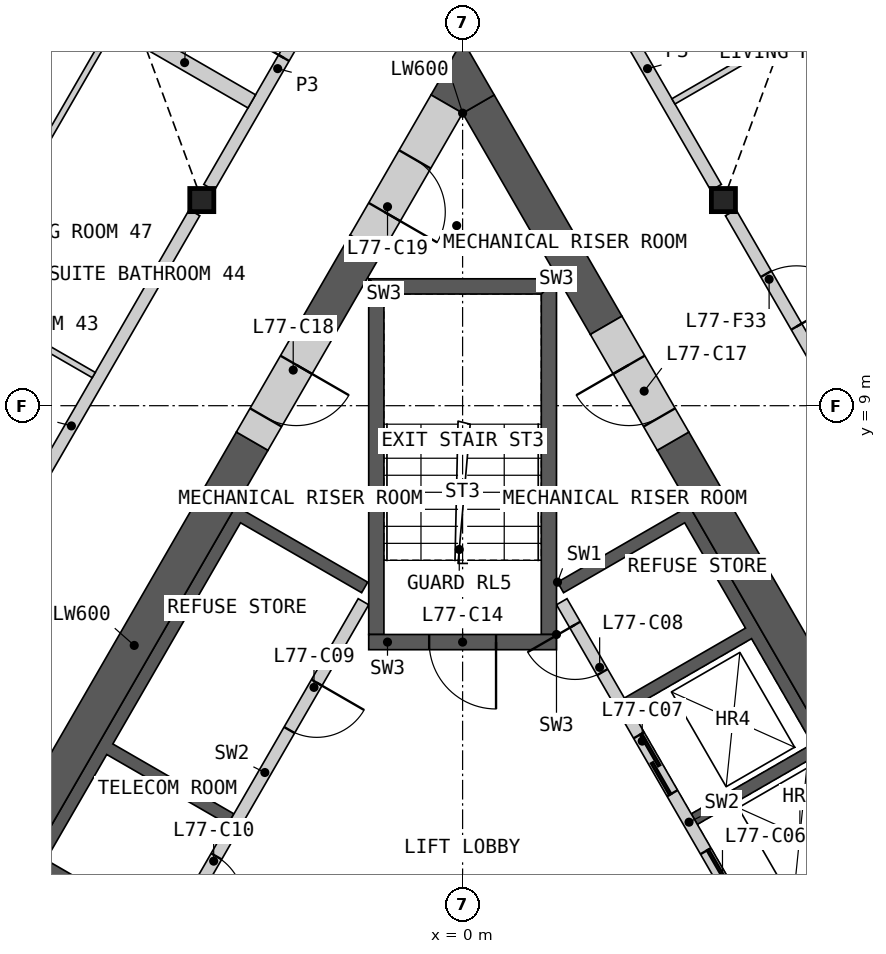
"""IFC4 building model, lengths in metres.
Left out: names, types, materials, properties, quantities, classifications, styles, units other than length and angle.
Written with IfcOpenShell. Run it as: python <this file> out.ifc"""

import sys

from ifc_helpers import new_model, si_unit, direction, frame, frame_2d, origin, origin_2d, place, context, subcontext, project, spatial, polyline, rectangle, i_section, outline, extrude, element, fill, save


model = new_model("IFC4")
c1 = context("Model", 3, precision=1e-05, world=origin(), true_north=direction((0.0, 1.0)))
c2 = subcontext(c1, "Body", "Model", "MODEL_VIEW")
j1 = project(units=[si_unit("LENGTHUNIT", "METRE"), si_unit("PLANEANGLEUNIT", "RADIAN")], contexts=[c1])
p1 = place(None, origin())
s1 = spatial("IfcSite", under=j1, at=p1, CompositionType="ELEMENT")
p2 = place(p1, origin())
s2 = spatial("IfcBuilding", under=s1, at=p2, CompositionType="ELEMENT")
p3 = place(p2, frame((0.0, 0.0, 342.6)))
s3 = spatial("IfcBuildingStorey", under=s2, at=p3, CompositionType="ELEMENT", Elevation=342.6)
for number, where, z_axis, x_axis in (
    (1, (-4.289, 12.382, 0.0), (0.0, 0.0, 1.0), (1.0, 0.0, 0.0)),
    (2, (4.289, 12.382, 0.0), (0.0, 0.0, 1.0), (1.0, 0.0, 0.0)),
):
    element("IfcColumn", number, at=place(p3, frame(where, z_axis=z_axis, x_axis=x_axis)), inside=s3, PredefinedType="COLUMN", context=c2, shape_type="SweptSolid", body=[
        extrude(i_section(OverallWidth=0.396, OverallDepth=0.381, WebThickness=0.019, FlangeThickness=0.03, at=origin_2d()), origin(), (0.0, 0.0, 1.0), 3.4),
    ])
p4 = place(p3, origin())
e3 = element("IfcWall", 3, at=p4, inside=s3, PredefinedType="SHEAR", context=c2, shape_type="SweptSolid", body=[
    extrude(outline(polyline([(1.561, 6.097), (3.731, 7.35), (8.231, -0.444), (6.061, -1.697), (5.96, -1.524), (7.952, -0.374), (6.952, 1.358), (4.96, 0.208), (4.861, 0.381), (6.852, 1.531), (5.852, 3.263), (3.861, 2.113), (3.76, 2.287), (5.752, 3.437), (4.752, 5.169), (2.76, 4.019), (2.66, 4.192), (4.652, 5.342), (3.652, 7.074), (1.66, 5.924), (1.561, 6.097)])), origin(), (0.0, 0.0, 1.0), 3.1),
])
p5 = place(p3, frame((5.817, -1.476, 0.0), z_axis=(0.0, 0.0, 1.0), x_axis=(-0.500002616675, 0.866023893041, 0.0)))
e4 = element("IfcWall", 4, at=p5, inside=s3, PredefinedType="SOLIDWALL", context=c2, shape_type="SweptSolid", body=[
    extrude(rectangle(XDim=8.373, YDim=0.2, at=frame_2d((4.187, 0.0))), origin(), (0.0, 0.0, 1.0), 3.1),
])
p6 = place(p5, frame((0.337, 0.0, 0.0)))
e5 = element("IfcOpeningElement", 5, at=p6, cuts=e4, PredefinedType="OPENING", context=c2, shape_type="SweptSolid", body=[
    extrude(rectangle(XDim=1.1, YDim=2.1, at=frame_2d((0.55, 1.05))), frame((0.0, 0.11, 0.0), z_axis=(0.0, -1.0, 0.0), x_axis=(1.0, 0.0, 0.0)), (0.0, 0.0, 1.0), 0.22),
])
p7 = place(p5, frame((2.537, 0.0, 0.0)))
e6 = element("IfcOpeningElement", 6, at=p7, cuts=e4, PredefinedType="OPENING", context=c2, shape_type="SweptSolid", body=[
    extrude(rectangle(XDim=1.1, YDim=2.1, at=frame_2d((0.55, 1.05))), frame((0.0, 0.11, 0.0), z_axis=(0.0, -1.0, 0.0), x_axis=(1.0, 0.0, 0.0)), (0.0, 0.0, 1.0), 0.22),
])
p8 = place(p5, frame((4.737, 0.0, 0.0)))
e7 = element("IfcOpeningElement", 7, at=p8, cuts=e4, PredefinedType="OPENING", context=c2, shape_type="SweptSolid", body=[
    extrude(rectangle(XDim=1.1, YDim=2.1, at=frame_2d((0.55, 1.05))), frame((0.0, 0.11, 0.0), z_axis=(0.0, -1.0, 0.0), x_axis=(1.0, 0.0, 0.0)), (0.0, 0.0, 1.0), 0.22),
])
p9 = place(p5, frame((7.037, 0.0, 0.0)))
e8 = element("IfcOpeningElement", 8, at=p9, cuts=e4, PredefinedType="OPENING", context=c2, shape_type="SweptSolid", body=[
    extrude(rectangle(XDim=0.9, YDim=2.1, at=frame_2d((0.45, 1.05))), frame((0.0, 0.11, 0.0), z_axis=(0.0, -1.0, 0.0), x_axis=(1.0, 0.0, 0.0)), (0.0, 0.0, 1.0), 0.22),
])
p10 = place(p3, origin())
e9 = element("IfcWall", 9, at=p10, inside=s3, PredefinedType="SHEAR", context=c2, shape_type="SweptSolid", body=[
    extrude(outline(polyline([(-4.96, 0.208), (-7.131, 1.461), (-3.731, 7.35), (-1.561, 6.097), (-1.66, 5.924), (-3.652, 7.074), (-5.752, 3.437), (-3.76, 2.287), (-3.861, 2.113), (-5.852, 3.263), (-6.852, 1.531), (-4.861, 0.381), (-4.96, 0.208)])), origin(), (0.0, 0.0, 1.0), 3.1),
])
p11 = place(p3, frame((-1.631, 5.776, 0.0), z_axis=(0.0, 0.0, 1.0), x_axis=(-0.499992876559, -0.866029516466, 0.0)))
e10 = element("IfcWall", 10, at=p11, inside=s3, PredefinedType="SOLIDWALL", context=c2, shape_type="SweptSolid", body=[
    extrude(rectangle(XDim=6.486, YDim=0.2, at=frame_2d((3.243, 0.0))), origin(), (0.0, 0.0, 1.0), 3.1),
])
p12 = place(p11, frame((1.537, 0.0, 0.0)))
e11 = element("IfcOpeningElement", 11, at=p12, cuts=e10, PredefinedType="OPENING", context=c2, shape_type="SweptSolid", body=[
    extrude(rectangle(XDim=0.9, YDim=2.1, at=frame_2d((0.45, 1.05))), frame((0.0, 0.11, 0.0), z_axis=(0.0, -1.0, 0.0), x_axis=(1.0, 0.0, 0.0)), (0.0, 0.0, 1.0), 0.22),
])
p13 = place(p11, frame((4.837, 0.0, 0.0)))
e12 = element("IfcOpeningElement", 12, at=p13, cuts=e10, PredefinedType="OPENING", context=c2, shape_type="SweptSolid", body=[
    extrude(rectangle(XDim=0.9, YDim=2.1, at=frame_2d((0.45, 1.05))), frame((0.0, 0.11, 0.0), z_axis=(0.0, -1.0, 0.0), x_axis=(1.0, 0.0, 0.0)), (0.0, 0.0, 1.0), 0.22),
])
p14 = place(p3, origin())
e13 = element("IfcWall", 13, at=p14, inside=s3, PredefinedType="SHEAR", context=c2, shape_type="SweptSolid", body=[
    extrude(outline(polyline([(1.544, 5.237), (1.544, 11.087), (1.294, 10.837), (1.294, 5.237), (1.544, 5.237)])), origin(), (0.0, 0.0, 1.0), 3.1),
])
p15 = place(p3, origin())
e14 = element("IfcWall", 14, at=p15, inside=s3, PredefinedType="SHEAR", context=c2, shape_type="SweptSolid", body=[
    extrude(outline(polyline([(1.544, 11.087), (-1.544, 11.087), (-1.294, 10.837), (1.294, 10.837), (1.544, 11.087)])), origin(), (0.0, 0.0, 1.0), 3.1),
])
p16 = place(p3, origin())
e15 = element("IfcWall", 15, at=p16, inside=s3, PredefinedType="SHEAR", context=c2, shape_type="SweptSolid", body=[
    extrude(outline(polyline([(-1.294, 10.837), (-1.544, 11.087), (-1.544, 5.237), (-1.294, 5.237), (-1.294, 10.837)])), origin(), (0.0, 0.0, 1.0), 3.1),
])
p17 = place(p3, frame((1.544, 5.112, 0.0), z_axis=(0.0, 0.0, 1.0), x_axis=(-1.0, 0.0, 0.0)))
e16 = element("IfcWall", 16, at=p17, inside=s3, PredefinedType="SHEAR", context=c2, shape_type="SweptSolid", body=[
    extrude(rectangle(XDim=3.088, YDim=0.25, at=frame_2d((1.544, 0.0))), origin(), (0.0, 0.0, 1.0), 3.1),
])
p18 = place(p17, frame((0.994, 0.0, 0.0)))
e17 = element("IfcOpeningElement", 17, at=p18, cuts=e16, PredefinedType="OPENING", context=c2, shape_type="SweptSolid", body=[
    extrude(rectangle(XDim=1.1, YDim=2.1, at=frame_2d((0.55, 1.05))), frame((0.0, 0.135, 0.0), z_axis=(0.0, -1.0, 0.0), x_axis=(1.0, 0.0, 0.0)), (0.0, 0.0, 1.0), 0.27),
])
p19 = place(p3, frame((8.686, -0.634, 0.0), z_axis=(0.0, 0.0, 1.0), x_axis=(-0.50001836461, 0.866014800712, 0.0)))
e18 = element("IfcWall", 18, at=p19, inside=s3, PredefinedType="SHEAR", context=c2, shape_type="SweptSolid", body=[
    extrude(rectangle(XDim=10.451, YDim=0.6, at=frame_2d((5.225, 0.0))), origin(), (0.0, 0.0, 1.0), 3.1),
])
p20 = place(p3, frame((2.361, 10.322, 0.0), z_axis=(0.0, 0.0, 1.0), x_axis=(-0.500000735859, 0.866024978935, 0.0)))
e19 = element("IfcWall", 19, at=p20, inside=s3, PredefinedType="SHEAR", context=c2, shape_type="SweptSolid", body=[
    extrude(rectangle(XDim=4.202, YDim=0.6, at=frame_2d((2.101, 0.0))), origin(), (0.0, 0.0, 1.0), 3.1),
])
p21 = place(p3, frame((-3.461, 8.417, 0.0), z_axis=(0.0, 0.0, 1.0), x_axis=(-0.50000391502, -0.866023143435, 0.0)))
e20 = element("IfcWall", 20, at=p21, inside=s3, PredefinedType="SHEAR", context=c2, shape_type="SweptSolid", body=[
    extrude(rectangle(XDim=7.759, YDim=0.6, at=frame_2d((3.879, 0.0))), origin(), (0.0, 0.0, 1.0), 3.1),
])
p22 = place(p3, frame((-1.59, 11.658, 0.0), z_axis=(0.0, 0.0, 1.0), x_axis=(-0.500037594623, -0.866003697431, 0.0)))
e21 = element("IfcWall", 21, at=p22, inside=s3, PredefinedType="SHEAR", context=c2, shape_type="SweptSolid", body=[
    extrude(rectangle(XDim=1.542, YDim=0.6, at=frame_2d((0.771, 0.0))), origin(), (0.0, 0.0, 1.0), 3.1),
])
p23 = place(p3, origin())
e22 = element("IfcWall", 22, at=p23, inside=s3, PredefinedType="SHEAR", context=c2, shape_type="SweptSolid", body=[
    extrude(outline(polyline([(0.0, 13.811), (-0.52, 14.111), (0.0, 15.011), (0.52, 14.111), (0.0, 13.811)])), origin(), (0.0, 0.0, 1.0), 3.1),
])
p24 = place(p3, frame((3.461, 8.417, 0.0), z_axis=(0.0, 0.0, 1.0), x_axis=(-0.499946605688, 0.86605622881, 0.0)))
e23 = element("IfcWall", 23, at=p24, inside=s3, PredefinedType="SHEAR", context=c2, shape_type="SweptSolid", body=[
    extrude(rectangle(XDim=2.2, YDim=0.6, at=frame_2d((1.1, 0.0))), origin(), (0.0, 0.0, 1.0), 3.1),
])
p25 = place(p24, frame((0.45, 0.0, 0.0)))
e24 = element("IfcOpeningElement", 24, at=p25, cuts=e23, PredefinedType="OPENING", context=c2, shape_type="SweptSolid", body=[
    extrude(rectangle(XDim=1.0, YDim=2.1, at=frame_2d((0.5, 1.05))), frame((0.0, 0.31, 0.0), z_axis=(0.0, -1.0, 0.0), x_axis=(1.0, 0.0, 0.0)), (0.0, 0.0, 1.0), 0.62),
])
p26 = place(p3, frame((-2.361, 10.322, 0.0), z_axis=(0.0, 0.0, 1.0), x_axis=(-0.499946605688, -0.86605622881, 0.0)))
e25 = element("IfcWall", 25, at=p26, inside=s3, PredefinedType="SHEAR", context=c2, shape_type="SweptSolid", body=[
    extrude(rectangle(XDim=2.2, YDim=0.6, at=frame_2d((1.1, 0.0))), origin(), (0.0, 0.0, 1.0), 3.1),
])
p27 = place(p26, frame((0.75, 0.0, 0.0)))
e26 = element("IfcOpeningElement", 26, at=p27, cuts=e25, PredefinedType="OPENING", context=c2, shape_type="SweptSolid", body=[
    extrude(rectangle(XDim=1.0, YDim=2.1, at=frame_2d((0.5, 1.05))), frame((0.0, 0.31, 0.0), z_axis=(0.0, -1.0, 0.0), x_axis=(1.0, 0.0, 0.0)), (0.0, 0.0, 1.0), 0.62),
])
p28 = place(p3, frame((-0.26, 13.961, 0.0), z_axis=(0.0, 0.0, 1.0), x_axis=(-0.49997936161, -0.866037319036, 0.0)))
e27 = element("IfcWall", 27, at=p28, inside=s3, PredefinedType="SHEAR", context=c2, shape_type="SweptSolid", body=[
    extrude(rectangle(XDim=2.66, YDim=0.6, at=frame_2d((1.33, 0.0))), origin(), (0.0, 0.0, 1.0), 3.1),
])
p29 = place(p28, frame((1.05, 0.0, 0.0)))
e28 = element("IfcOpeningElement", 28, at=p29, cuts=e27, PredefinedType="OPENING", context=c2, shape_type="SweptSolid", body=[
    extrude(rectangle(XDim=1.0, YDim=2.1, at=frame_2d((0.5, 1.05))), frame((0.0, 0.31, 0.0), z_axis=(0.0, -1.0, 0.0), x_axis=(1.0, 0.0, 0.0)), (0.0, 0.0, 1.0), 0.62),
])
p30 = place(p3, frame((4.409, 12.174, 0.0), z_axis=(0.0, 0.0, 1.0), x_axis=(0.499984266882, -0.866034487114, 0.0)))
e29 = element("IfcWall", 29, at=p30, inside=s3, PredefinedType="PARTITIONING", context=c2, shape_type="SweptSolid", body=[
    extrude(rectangle(XDim=8.099, YDim=0.2, at=frame_2d((4.049, 0.0))), origin(), (0.0, 0.0, 1.0), 3.1),
])
p31 = place(p30, frame((5.123, 0.0, 0.0)))
e30 = element("IfcOpeningElement", 30, at=p31, cuts=e29, PredefinedType="OPENING", context=c2, shape_type="SweptSolid", body=[
    extrude(rectangle(XDim=1.0, YDim=2.1, at=frame_2d((0.5, 1.05))), frame((0.0, 0.11, 0.0), z_axis=(0.0, -1.0, 0.0), x_axis=(1.0, 0.0, 0.0)), (0.0, 0.0, 1.0), 0.22),
])
p32 = place(p30, frame((1.164, 0.0, 0.0)))
e31 = element("IfcOpeningElement", 31, at=p32, cuts=e29, PredefinedType="OPENING", context=c2, shape_type="SweptSolid", body=[
    extrude(rectangle(XDim=1.0, YDim=2.1, at=frame_2d((0.5, 1.05))), frame((0.0, 0.11, 0.0), z_axis=(0.0, -1.0, 0.0), x_axis=(1.0, 0.0, 0.0)), (0.0, 0.0, 1.0), 0.22),
])
p33 = place(p3, frame((-8.458, 5.16, 0.0), z_axis=(0.0, 0.0, 1.0), x_axis=(0.499984266882, 0.866034487114, 0.0)))
e32 = element("IfcWall", 32, at=p33, inside=s3, PredefinedType="PARTITIONING", context=c2, shape_type="SweptSolid", body=[
    extrude(rectangle(XDim=8.099, YDim=0.2, at=frame_2d((4.049, 0.0))), origin(), (0.0, 0.0, 1.0), 3.1),
])
p34 = place(p33, frame((1.164, 0.0, 0.0)))
e33 = element("IfcOpeningElement", 33, at=p34, cuts=e32, PredefinedType="OPENING", context=c2, shape_type="SweptSolid", body=[
    extrude(rectangle(XDim=1.0, YDim=2.1, at=frame_2d((0.5, 1.05))), frame((0.0, 0.11, 0.0), z_axis=(0.0, -1.0, 0.0), x_axis=(1.0, 0.0, 0.0)), (0.0, 0.0, 1.0), 0.22),
])
p35 = place(p3, frame((-4.169, 12.59, 0.0), z_axis=(0.0, 0.0, 1.0), x_axis=(0.499950370306, 0.866054055606, 0.0)))
e34 = element("IfcWall", 34, at=p35, inside=s3, PredefinedType="PARTITIONING", context=c2, shape_type="SweptSolid", body=[
    extrude(rectangle(XDim=4.513, YDim=0.2, at=frame_2d((2.256, 0.0))), origin(), (0.0, 0.0, 1.0), 3.1),
])
p36 = place(p35, frame((2.459, 0.0, 0.0)))
e35 = element("IfcOpeningElement", 35, at=p36, cuts=e34, PredefinedType="OPENING", context=c2, shape_type="SweptSolid", body=[
    extrude(rectangle(XDim=1.0, YDim=2.1, at=frame_2d((0.5, 1.05))), frame((0.0, 0.11, 0.0), z_axis=(0.0, -1.0, 0.0), x_axis=(1.0, 0.0, 0.0)), (0.0, 0.0, 1.0), 0.22),
])
p37 = place(p3, frame((1.913, 16.498, 0.0), z_axis=(0.0, 0.0, 1.0), x_axis=(0.499950370306, -0.866054055606, 0.0)))
e36 = element("IfcWall", 36, at=p37, inside=s3, PredefinedType="PARTITIONING", context=c2, shape_type="SweptSolid", body=[
    extrude(rectangle(XDim=4.513, YDim=0.2, at=frame_2d((2.256, 0.0))), origin(), (0.0, 0.0, 1.0), 3.1),
])
p38 = place(p3, frame((-5.676, 15.28, 0.0), z_axis=(0.0, 0.0, 1.0), x_axis=(0.865989465428, -0.500062241894, 0.0)))
e37 = element("IfcWall", 37, at=p38, inside=s3, PredefinedType="PARTITIONING", context=c2, shape_type="SweptSolid", body=[
    extrude(rectangle(XDim=2.55, YDim=0.25, at=frame_2d((1.275, 0.0))), origin(), (0.0, 0.0, 1.0), 2.33),
])
p39 = place(p3, frame((3.468, 14.005, 0.0), z_axis=(0.0, 0.0, 1.0), x_axis=(0.866020616849, 0.500008291124, 0.0)))
e38 = element("IfcWall", 38, at=p39, inside=s3, PredefinedType="PARTITIONING", context=c2, shape_type="SweptSolid", body=[
    extrude(rectangle(XDim=12.643, YDim=0.1, at=frame_2d((6.321, 0.0))), origin(), (0.0, 0.0, 1.0), 2.33),
])
p40 = place(p39, frame((8.115, 0.0, 0.0)))
e39 = element("IfcOpeningElement", 39, at=p40, cuts=e38, PredefinedType="OPENING", context=c2, shape_type="SweptSolid", body=[
    extrude(rectangle(XDim=0.95, YDim=2.1, at=frame_2d((0.475, 1.05))), frame((0.0, 0.06, 0.0), z_axis=(0.0, -1.0, 0.0), x_axis=(1.0, 0.0, 0.0)), (0.0, 0.0, 1.0), 0.12),
])
p41 = place(p3, frame((-12.962, 13.485, 0.0), z_axis=(0.0, 0.0, 1.0), x_axis=(0.866021168401, -0.500007335828, 0.0)))
e40 = element("IfcWall", 40, at=p41, inside=s3, PredefinedType="PARTITIONING", context=c2, shape_type="SweptSolid", body=[
    extrude(rectangle(XDim=7.962, YDim=0.1, at=frame_2d((3.981, 0.0))), origin(), (0.0, 0.0, 1.0), 2.33),
])
p42 = place(p41, frame((2.154, 0.0, 0.0)))
e41 = element("IfcOpeningElement", 41, at=p42, cuts=e40, PredefinedType="OPENING", context=c2, shape_type="SweptSolid", body=[
    extrude(rectangle(XDim=0.95, YDim=2.1, at=frame_2d((0.475, 1.05))), frame((0.0, 0.06, 0.0), z_axis=(0.0, -1.0, 0.0), x_axis=(1.0, 0.0, 0.0)), (0.0, 0.0, 1.0), 0.12),
])
p43 = place(p3, frame((-7.094, 12.924, 0.0), z_axis=(0.0, 0.0, 1.0), x_axis=(0.499996545922, 0.866027397988, 0.0)))
e42 = element("IfcWall", 42, at=p43, inside=s3, PredefinedType="PARTITIONING", context=c2, shape_type="SweptSolid", body=[
    extrude(rectangle(XDim=5.5, YDim=0.1, at=frame_2d((2.75, 0.0))), origin(), (0.0, 0.0, 1.0), 2.33),
])
p44 = place(p3, frame((-9.519, 14.323, 0.0), z_axis=(0.0, 0.0, 1.0), x_axis=(0.499996545922, 0.866027397988, 0.0)))
e43 = element("IfcWall", 43, at=p44, inside=s3, PredefinedType="PARTITIONING", context=c2, shape_type="SweptSolid", body=[
    extrude(rectangle(XDim=5.5, YDim=0.1, at=frame_2d((2.75, 0.0))), origin(), (0.0, 0.0, 1.0), 2.33),
])
p45 = place(p44, frame((4.3, 0.0, 0.0)))
e44 = element("IfcOpeningElement", 44, at=p45, cuts=e43, PredefinedType="OPENING", context=c2, shape_type="SweptSolid", body=[
    extrude(rectangle(XDim=0.95, YDim=2.1, at=frame_2d((0.475, 1.05))), frame((0.0, 0.06, 0.0), z_axis=(0.0, -1.0, 0.0), x_axis=(1.0, 0.0, 0.0)), (0.0, 0.0, 1.0), 0.12),
])
p46 = place(p44, frame((0.25, 0.0, 0.0)))
e45 = element("IfcOpeningElement", 45, at=p46, cuts=e43, PredefinedType="OPENING", context=c2, shape_type="SweptSolid", body=[
    extrude(rectangle(XDim=0.95, YDim=2.1, at=frame_2d((0.475, 1.05))), frame((0.0, 0.06, 0.0), z_axis=(0.0, -1.0, 0.0), x_axis=(1.0, 0.0, 0.0)), (0.0, 0.0, 1.0), 0.12),
])
p47 = place(p7, origin())
e46 = element("IfcDoor", 46, at=p47, inside=s3, OperationType="SLIDING_TO_LEFT", PredefinedType="DOOR", context=c2, shape_type="SweptSolid", body=[
    extrude(rectangle(XDim=1.1, YDim=2.1, at=frame_2d((0.55, 1.05))), frame((0.0, 0.025, 0.0), z_axis=(0.0, -1.0, 0.0), x_axis=(1.0, 0.0, 0.0)), (0.0, 0.0, 1.0), 0.05),
])
fill(e6, e46)
p48 = place(p8, origin())
e47 = element("IfcDoor", 47, at=p48, inside=s3, OperationType="SLIDING_TO_LEFT", PredefinedType="DOOR", context=c2, shape_type="SweptSolid", body=[
    extrude(rectangle(XDim=1.1, YDim=2.1, at=frame_2d((0.55, 1.05))), frame((0.0, 0.025, 0.0), z_axis=(0.0, -1.0, 0.0), x_axis=(1.0, 0.0, 0.0)), (0.0, 0.0, 1.0), 0.05),
])
fill(e7, e47)
p49 = place(p9, origin())
e48 = element("IfcDoor", 48, at=p49, inside=s3, OperationType="SINGLE_SWING_RIGHT", PredefinedType="DOOR", context=c2, shape_type="SweptSolid", body=[
    extrude(rectangle(XDim=0.9, YDim=2.1, at=frame_2d((0.45, 1.05))), frame((0.0, 0.025, 0.0), z_axis=(0.0, -1.0, 0.0), x_axis=(1.0, 0.0, 0.0)), (0.0, 0.0, 1.0), 0.05),
])
fill(e8, e48)
p50 = place(p12, origin())
e49 = element("IfcDoor", 49, at=p50, inside=s3, OperationType="SINGLE_SWING_LEFT", PredefinedType="DOOR", context=c2, shape_type="SweptSolid", body=[
    extrude(rectangle(XDim=0.9, YDim=2.1, at=frame_2d((0.45, 1.05))), frame((0.0, 0.025, 0.0), z_axis=(0.0, -1.0, 0.0), x_axis=(1.0, 0.0, 0.0)), (0.0, 0.0, 1.0), 0.05),
])
fill(e11, e49)
p51 = place(p13, origin())
e50 = element("IfcDoor", 50, at=p51, inside=s3, OperationType="SINGLE_SWING_RIGHT", PredefinedType="DOOR", context=c2, shape_type="SweptSolid", body=[
    extrude(rectangle(XDim=0.9, YDim=2.1, at=frame_2d((0.45, 1.05))), frame((0.0, 0.025, 0.0), z_axis=(0.0, -1.0, 0.0), x_axis=(1.0, 0.0, 0.0)), (0.0, 0.0, 1.0), 0.05),
])
fill(e12, e50)
p52 = place(p18, origin())
e51 = element("IfcDoor", 51, at=p52, inside=s3, OperationType="SINGLE_SWING_LEFT", PredefinedType="DOOR", context=c2, shape_type="SweptSolid", body=[
    extrude(rectangle(XDim=1.1, YDim=2.1, at=frame_2d((0.55, 1.05))), frame((0.0, 0.025, 0.0), z_axis=(0.0, -1.0, 0.0), x_axis=(1.0, 0.0, 0.0)), (0.0, 0.0, 1.0), 0.05),
])
fill(e17, e51)
p53 = place(p25, origin())
e52 = element("IfcDoor", 52, at=p53, inside=s3, OperationType="SINGLE_SWING_RIGHT", PredefinedType="DOOR", context=c2, shape_type="SweptSolid", body=[
    extrude(rectangle(XDim=1.0, YDim=2.1, at=frame_2d((0.5, 1.05))), frame((0.0, 0.055, 0.0), z_axis=(0.0, -1.0, 0.0), x_axis=(1.0, 0.0, 0.0)), (0.0, 0.0, 1.0), 0.05),
])
fill(e24, e52)
p54 = place(p27, origin())
e53 = element("IfcDoor", 53, at=p54, inside=s3, OperationType="SINGLE_SWING_LEFT", PredefinedType="DOOR", context=c2, shape_type="SweptSolid", body=[
    extrude(rectangle(XDim=1.0, YDim=2.1, at=frame_2d((0.5, 1.05))), frame((0.0, 0.055, 0.0), z_axis=(0.0, -1.0, 0.0), x_axis=(1.0, 0.0, 0.0)), (0.0, 0.0, 1.0), 0.05),
])
fill(e26, e53)
p55 = place(p29, origin())
e54 = element("IfcDoor", 54, at=p55, inside=s3, OperationType="SINGLE_SWING_RIGHT", PredefinedType="DOOR", context=c2, shape_type="SweptSolid", body=[
    extrude(rectangle(XDim=1.0, YDim=2.1, at=frame_2d((0.5, 1.05))), frame((0.0, 0.055, 0.0), z_axis=(0.0, -1.0, 0.0), x_axis=(1.0, 0.0, 0.0)), (0.0, 0.0, 1.0), 0.05),
])
fill(e28, e54)
p56 = place(p32, origin())
e55 = element("IfcDoor", 55, at=p56, inside=s3, OperationType="SINGLE_SWING_RIGHT", PredefinedType="DOOR", context=c2, shape_type="SweptSolid", body=[
    extrude(rectangle(XDim=1.0, YDim=2.1, at=frame_2d((0.5, 1.05))), frame((0.0, 0.025, 0.0), z_axis=(0.0, -1.0, 0.0), x_axis=(1.0, 0.0, 0.0)), (0.0, 0.0, 1.0), 0.05),
])
fill(e31, e55)
p57 = place(p36, origin())
e56 = element("IfcDoor", 56, at=p57, inside=s3, OperationType="SINGLE_SWING_LEFT", PredefinedType="DOOR", context=c2, shape_type="SweptSolid", body=[
    extrude(rectangle(XDim=1.0, YDim=2.1, at=frame_2d((0.5, 1.05))), frame((0.0, 0.025, 0.0), z_axis=(0.0, -1.0, 0.0), x_axis=(1.0, 0.0, 0.0)), (0.0, 0.0, 1.0), 0.05),
])
fill(e35, e56)
save(model, sys.argv[1])
